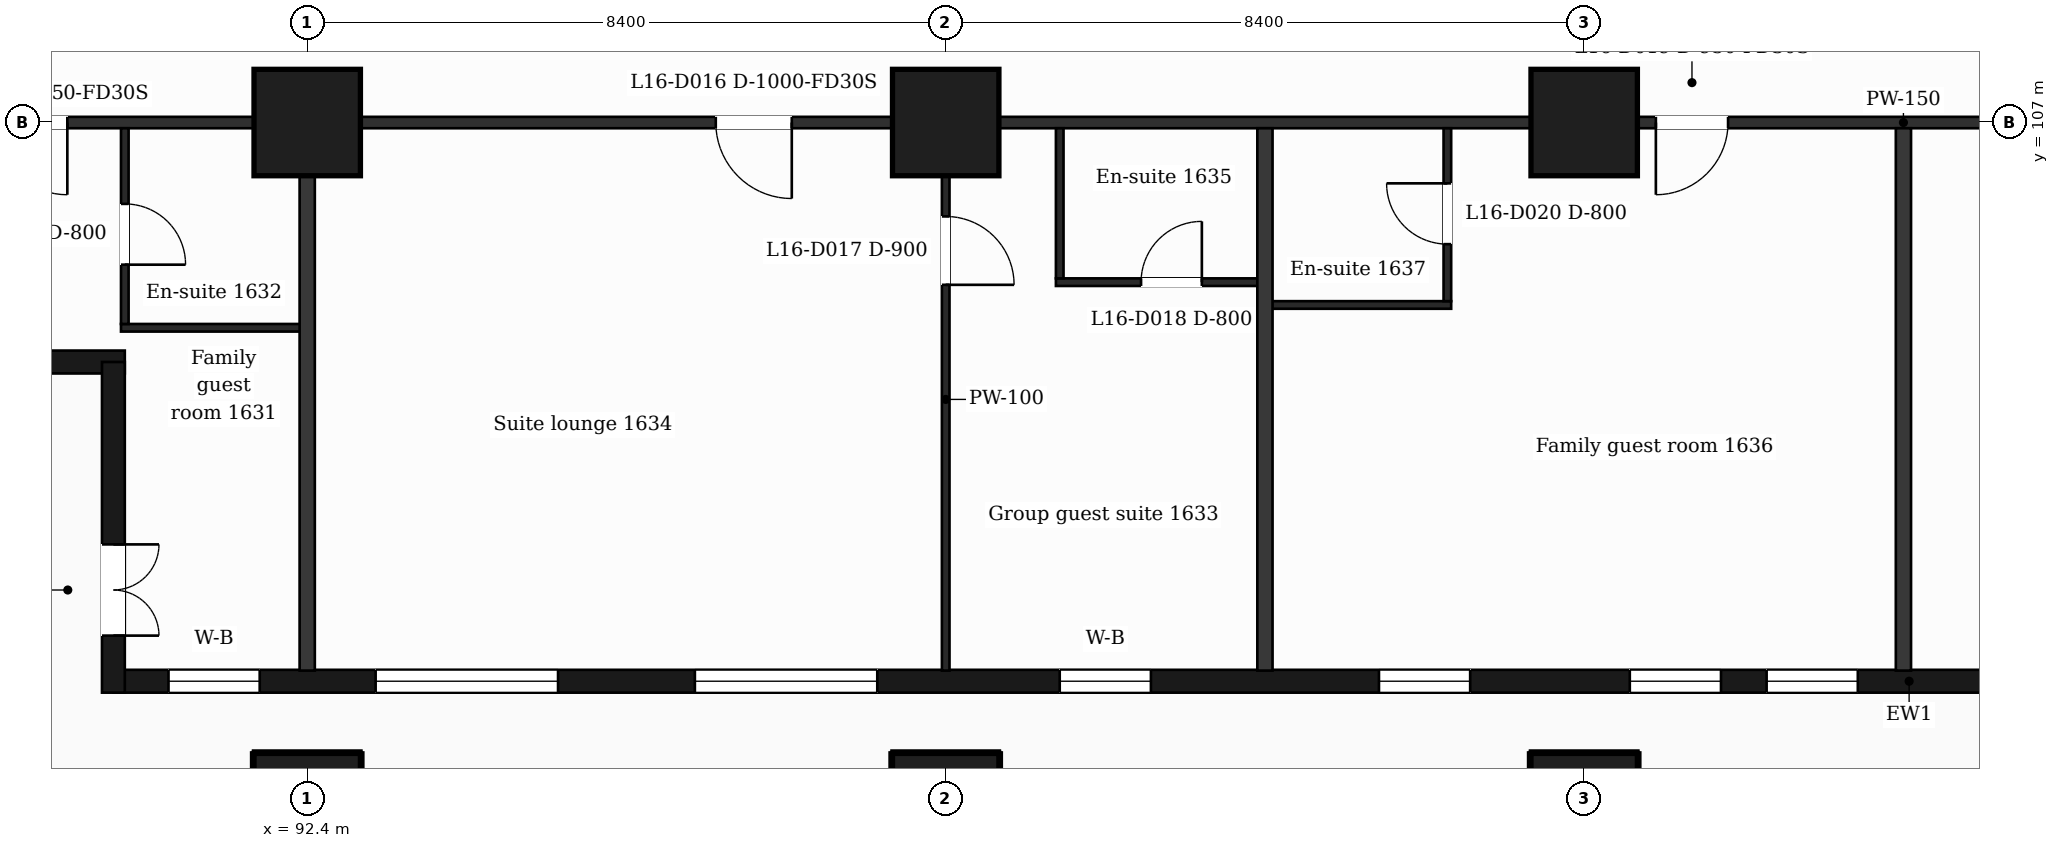
"""IFC4 building model, lengths in metres.
Left out: names, types, materials, properties, quantities, classifications, styles, units other than length and angle.
Written with IfcOpenShell. Run it as: python <this file> out.ifc"""

import sys

from ifc_helpers import new_model, si_unit, direction, frame, frame_2d, origin, origin_2d, place, context, subcontext, project, spatial, rectangle, extrude, element, fill, save


model = new_model("IFC4")
c1 = context("Model", 3, precision=1e-05, world=origin(), true_north=direction((0.0, 1.0)))
c2 = subcontext(c1, "Body", "Model", "MODEL_VIEW")
j1 = project(units=[si_unit("LENGTHUNIT", "METRE"), si_unit("PLANEANGLEUNIT", "RADIAN")], contexts=[c1])
p1 = place(None, origin())
s1 = spatial("IfcSite", under=j1, at=p1, CompositionType="ELEMENT")
p2 = place(p1, origin())
s2 = spatial("IfcBuilding", under=s1, at=p2, CompositionType="ELEMENT")
p3 = place(p2, frame((0.0, 0.0, 74.0)))
s3 = spatial("IfcBuildingStorey", under=s2, at=p3, CompositionType="ELEMENT", Elevation=74.0)
for number, where, z_axis, x_axis in (
    (1, (92.4, 98.0, 0.0), (0.0, 0.0, 1.0), (1.0, 0.0, 0.0)),
    (2, (100.8, 98.0, 0.0), (0.0, 0.0, 1.0), (1.0, 0.0, 0.0)),
    (3, (109.2, 98.0, 0.0), (0.0, 0.0, 1.0), (1.0, 0.0, 0.0)),
    (4, (92.4, 107.0, 0.0), (0.0, 0.0, 1.0), (1.0, 0.0, 0.0)),
    (5, (100.8, 107.0, 0.0), (0.0, 0.0, 1.0), (1.0, 0.0, 0.0)),
    (6, (109.2, 107.0, 0.0), (0.0, 0.0, 1.0), (1.0, 0.0, 0.0)),
):
    element("IfcColumn", number, at=place(p3, frame(where, z_axis=z_axis, x_axis=x_axis)), inside=s3, PredefinedType="COLUMN", context=c2, shape_type="SweptSolid", body=[
        extrude(rectangle(XDim=1.4, YDim=1.4, at=origin_2d()), origin(), (0.0, 0.0, 1.0), 3.5),
    ])
p4 = place(p3, frame((89.85, 99.65, 0.0), z_axis=(0.0, 0.0, 1.0), x_axis=(1.0, 0.0, 0.0)))
e7 = element("IfcWall", 7, at=p4, inside=s3, PredefinedType="SOLIDWALL", context=c2, shape_type="SweptSolid", body=[
    extrude(rectangle(XDim=47.25, YDim=0.3, at=frame_2d((23.625, 0.0))), origin(), (0.0, 0.0, 1.0), 3.18),
])
p5 = place(p4, frame((0.725, 0.0, 0.9)))
e8 = element("IfcOpeningElement", 8, at=p5, cuts=e7, PredefinedType="OPENING", context=c2, shape_type="SweptSolid", body=[
    extrude(rectangle(XDim=1.2, YDim=2.1, at=frame_2d((0.6, 1.05))), frame((0.0, 0.16, 0.0), z_axis=(0.0, -1.0, 0.0), x_axis=(1.0, 0.0, 0.0)), (0.0, 0.0, 1.0), 0.32),
])
p6 = place(p4, frame((3.45, 0.0, 0.9)))
e9 = element("IfcOpeningElement", 9, at=p6, cuts=e7, PredefinedType="OPENING", context=c2, shape_type="SweptSolid", body=[
    extrude(rectangle(XDim=2.4, YDim=2.1, at=frame_2d((1.2, 1.05))), frame((0.0, 0.16, 0.0), z_axis=(0.0, -1.0, 0.0), x_axis=(1.0, 0.0, 0.0)), (0.0, 0.0, 1.0), 0.32),
])
p7 = place(p4, frame((7.65, 0.0, 0.9)))
e10 = element("IfcOpeningElement", 10, at=p7, cuts=e7, PredefinedType="OPENING", context=c2, shape_type="SweptSolid", body=[
    extrude(rectangle(XDim=2.4, YDim=2.1, at=frame_2d((1.2, 1.05))), frame((0.0, 0.16, 0.0), z_axis=(0.0, -1.0, 0.0), x_axis=(1.0, 0.0, 0.0)), (0.0, 0.0, 1.0), 0.32),
])
p8 = place(p4, frame((12.45, 0.0, 0.9)))
e11 = element("IfcOpeningElement", 11, at=p8, cuts=e7, PredefinedType="OPENING", context=c2, shape_type="SweptSolid", body=[
    extrude(rectangle(XDim=1.2, YDim=2.1, at=frame_2d((0.6, 1.05))), frame((0.0, 0.16, 0.0), z_axis=(0.0, -1.0, 0.0), x_axis=(1.0, 0.0, 0.0)), (0.0, 0.0, 1.0), 0.32),
])
p9 = place(p4, frame((16.65, 0.0, 0.9)))
e12 = element("IfcOpeningElement", 12, at=p9, cuts=e7, PredefinedType="OPENING", context=c2, shape_type="SweptSolid", body=[
    extrude(rectangle(XDim=1.2, YDim=2.1, at=frame_2d((0.6, 1.05))), frame((0.0, 0.16, 0.0), z_axis=(0.0, -1.0, 0.0), x_axis=(1.0, 0.0, 0.0)), (0.0, 0.0, 1.0), 0.32),
])
p10 = place(p4, frame((19.95, 0.0, 0.9)))
e13 = element("IfcOpeningElement", 13, at=p10, cuts=e7, PredefinedType="OPENING", context=c2, shape_type="SweptSolid", body=[
    extrude(rectangle(XDim=1.2, YDim=2.1, at=frame_2d((0.6, 1.05))), frame((0.0, 0.16, 0.0), z_axis=(0.0, -1.0, 0.0), x_axis=(1.0, 0.0, 0.0)), (0.0, 0.0, 1.0), 0.32),
])
p11 = place(p4, frame((21.75, 0.0, 0.9)))
e14 = element("IfcOpeningElement", 14, at=p11, cuts=e7, PredefinedType="OPENING", context=c2, shape_type="SweptSolid", body=[
    extrude(rectangle(XDim=1.2, YDim=2.1, at=frame_2d((0.6, 1.05))), frame((0.0, 0.16, 0.0), z_axis=(0.0, -1.0, 0.0), x_axis=(1.0, 0.0, 0.0)), (0.0, 0.0, 1.0), 0.32),
])
p12 = place(p4, frame((25.05, 0.0, 0.0)))
e15 = element("IfcOpeningElement", 15, at=p12, cuts=e7, PredefinedType="OPENING", context=c2, shape_type="SweptSolid", body=[
    extrude(rectangle(XDim=1.2, YDim=2.4, at=frame_2d((0.6, 1.2))), frame((0.0, 0.16, 0.0), z_axis=(0.0, -1.0, 0.0), x_axis=(1.0, 0.0, 0.0)), (0.0, 0.0, 1.0), 0.32),
])
p13 = place(p4, frame((28.35, 0.0, 0.9)))
e16 = element("IfcOpeningElement", 16, at=p13, cuts=e7, PredefinedType="OPENING", context=c2, shape_type="SweptSolid", body=[
    extrude(rectangle(XDim=1.2, YDim=2.1, at=frame_2d((0.6, 1.05))), frame((0.0, 0.16, 0.0), z_axis=(0.0, -1.0, 0.0), x_axis=(1.0, 0.0, 0.0)), (0.0, 0.0, 1.0), 0.32),
])
p14 = place(p4, frame((30.15, 0.0, 0.9)))
e17 = element("IfcOpeningElement", 17, at=p14, cuts=e7, PredefinedType="OPENING", context=c2, shape_type="SweptSolid", body=[
    extrude(rectangle(XDim=1.2, YDim=2.1, at=frame_2d((0.6, 1.05))), frame((0.0, 0.16, 0.0), z_axis=(0.0, -1.0, 0.0), x_axis=(1.0, 0.0, 0.0)), (0.0, 0.0, 1.0), 0.32),
])
p15 = place(p4, frame((32.85, 0.0, 0.9)))
e18 = element("IfcOpeningElement", 18, at=p15, cuts=e7, PredefinedType="OPENING", context=c2, shape_type="SweptSolid", body=[
    extrude(rectangle(XDim=2.4, YDim=2.1, at=frame_2d((1.2, 1.05))), frame((0.0, 0.16, 0.0), z_axis=(0.0, -1.0, 0.0), x_axis=(1.0, 0.0, 0.0)), (0.0, 0.0, 1.0), 0.32),
])
p16 = place(p4, frame((37.05, 0.0, 0.9)))
e19 = element("IfcOpeningElement", 19, at=p16, cuts=e7, PredefinedType="OPENING", context=c2, shape_type="SweptSolid", body=[
    extrude(rectangle(XDim=2.4, YDim=2.1, at=frame_2d((1.2, 1.05))), frame((0.0, 0.16, 0.0), z_axis=(0.0, -1.0, 0.0), x_axis=(1.0, 0.0, 0.0)), (0.0, 0.0, 1.0), 0.32),
])
p17 = place(p4, frame((41.85, 0.0, 0.9)))
e20 = element("IfcOpeningElement", 20, at=p17, cuts=e7, PredefinedType="OPENING", context=c2, shape_type="SweptSolid", body=[
    extrude(rectangle(XDim=1.2, YDim=2.1, at=frame_2d((0.6, 1.05))), frame((0.0, 0.16, 0.0), z_axis=(0.0, -1.0, 0.0), x_axis=(1.0, 0.0, 0.0)), (0.0, 0.0, 1.0), 0.32),
])
p18 = place(p4, frame((45.25, 0.0, 0.9)))
e21 = element("IfcOpeningElement", 21, at=p18, cuts=e7, PredefinedType="OPENING", context=c2, shape_type="SweptSolid", body=[
    extrude(rectangle(XDim=1.2, YDim=2.1, at=frame_2d((0.6, 1.05))), frame((0.0, 0.16, 0.0), z_axis=(0.0, -1.0, 0.0), x_axis=(1.0, 0.0, 0.0)), (0.0, 0.0, 1.0), 0.32),
])
p19 = place(p3, frame((86.452, 103.85, 0.0), z_axis=(0.0, 0.0, 1.0), x_axis=(1.0, 0.0, 0.0)))
e22 = element("IfcWall", 22, at=p19, inside=s3, PredefinedType="SOLIDWALL", context=c2, shape_type="SweptSolid", body=[
    extrude(rectangle(XDim=3.548, YDim=0.3, at=frame_2d((1.774, 0.0))), origin(), (0.0, 0.0, 1.0), 3.18),
])
p20 = place(p3, frame((89.85, 103.85, 0.0), z_axis=(0.0, 0.0, 1.0), x_axis=(0.0, -1.0, 0.0)))
e23 = element("IfcWall", 23, at=p20, inside=s3, PredefinedType="SOLIDWALL", context=c2, shape_type="SweptSolid", body=[
    extrude(rectangle(XDim=4.35, YDim=0.3, at=frame_2d((2.175, 0.0))), origin(), (0.0, 0.0, 1.0), 3.18),
])
p21 = place(p20, frame((2.4, 0.0, 0.0)))
e24 = element("IfcOpeningElement", 24, at=p21, cuts=e23, PredefinedType="OPENING", context=c2, shape_type="SweptSolid", body=[
    extrude(rectangle(XDim=1.2, YDim=2.4, at=frame_2d((0.6, 1.2))), frame((0.0, 0.16, 0.0), z_axis=(0.0, -1.0, 0.0), x_axis=(1.0, 0.0, 0.0)), (0.0, 0.0, 1.0), 0.32),
])
for number, where, z_axis, x_axis in (
    (25, (89.95, 104.3, 0.0), (0.0, 0.0, 1.0), (1.0, 0.0, 0.0)),
    (26, (105.0, 104.6, 0.0), (0.0, 0.0, 1.0), (1.0, 0.0, 0.0)),
):
    element("IfcWall", number, at=place(p3, frame(where, z_axis=z_axis, x_axis=x_axis)), inside=s3, PredefinedType="PARTITIONING", context=c2, shape_type="SweptSolid", body=[
        extrude(rectangle(XDim=2.45, YDim=0.1, at=frame_2d((1.225, 0.0))), origin(), (0.0, 0.0, 1.0), 3.18),
    ])
p22 = place(p3, frame((102.25, 104.9, 0.0), z_axis=(0.0, 0.0, 1.0), x_axis=(1.0, 0.0, 0.0)))
e27 = element("IfcWall", 27, at=p22, inside=s3, PredefinedType="PARTITIONING", context=c2, shape_type="SweptSolid", body=[
    extrude(rectangle(XDim=2.75, YDim=0.1, at=frame_2d((1.375, 0.0))), origin(), (0.0, 0.0, 1.0), 3.18),
])
p23 = place(p22, frame((1.12, 0.0, 0.0)))
e28 = element("IfcOpeningElement", 28, at=p23, cuts=e27, PredefinedType="OPENING", context=c2, shape_type="SweptSolid", body=[
    extrude(rectangle(XDim=0.8, YDim=2.1, at=frame_2d((0.4, 1.05))), frame((0.0, 0.06, 0.0), z_axis=(0.0, -1.0, 0.0), x_axis=(1.0, 0.0, 0.0)), (0.0, 0.0, 1.0), 0.12),
])
p24 = place(p3, frame((87.018, 107.0, 0.0), z_axis=(0.0, 0.0, 1.0), x_axis=(1.0, 0.0, 0.0)))
e29 = element("IfcWall", 29, at=p24, inside=s3, PredefinedType="PARTITIONING", context=c2, shape_type="SweptSolid", body=[
    extrude(rectangle(XDim=52.765, YDim=0.15, at=frame_2d((26.382, 0.0))), origin(), (0.0, 0.0, 1.0), 3.18),
])
p25 = place(p24, frame((1.276, 0.0, 0.0)))
e30 = element("IfcOpeningElement", 30, at=p25, cuts=e29, PredefinedType="OPENING", context=c2, shape_type="SweptSolid", body=[
    extrude(rectangle(XDim=0.95, YDim=2.1, at=frame_2d((0.475, 1.05))), frame((0.0, 0.085, 0.0), z_axis=(0.0, -1.0, 0.0), x_axis=(1.0, 0.0, 0.0)), (0.0, 0.0, 1.0), 0.17),
])
p26 = place(p24, frame((10.757, 0.0, 0.0)))
e31 = element("IfcOpeningElement", 31, at=p26, cuts=e29, PredefinedType="OPENING", context=c2, shape_type="SweptSolid", body=[
    extrude(rectangle(XDim=1.0, YDim=2.1, at=frame_2d((0.5, 1.05))), frame((0.0, 0.085, 0.0), z_axis=(0.0, -1.0, 0.0), x_axis=(1.0, 0.0, 0.0)), (0.0, 0.0, 1.0), 0.17),
])
p27 = place(p24, frame((23.125, 0.0, 0.0)))
e32 = element("IfcOpeningElement", 32, at=p27, cuts=e29, PredefinedType="OPENING", context=c2, shape_type="SweptSolid", body=[
    extrude(rectangle(XDim=0.95, YDim=2.1, at=frame_2d((0.475, 1.05))), frame((0.0, 0.085, 0.0), z_axis=(0.0, -1.0, 0.0), x_axis=(1.0, 0.0, 0.0)), (0.0, 0.0, 1.0), 0.17),
])
p28 = place(p24, frame((31.757, 0.0, 0.0)))
e33 = element("IfcOpeningElement", 33, at=p28, cuts=e29, PredefinedType="OPENING", context=c2, shape_type="SweptSolid", body=[
    extrude(rectangle(XDim=1.0, YDim=2.1, at=frame_2d((0.5, 1.05))), frame((0.0, 0.085, 0.0), z_axis=(0.0, -1.0, 0.0), x_axis=(1.0, 0.0, 0.0)), (0.0, 0.0, 1.0), 0.17),
])
p29 = place(p24, frame((42.819, 0.0, 0.0)))
e34 = element("IfcOpeningElement", 34, at=p29, cuts=e29, PredefinedType="OPENING", context=c2, shape_type="SweptSolid", body=[
    extrude(rectangle(XDim=0.95, YDim=2.1, at=frame_2d((0.475, 1.05))), frame((0.0, 0.085, 0.0), z_axis=(0.0, -1.0, 0.0), x_axis=(1.0, 0.0, 0.0)), (0.0, 0.0, 1.0), 0.17),
])
p30 = place(p24, frame((48.974, 0.0, 0.0)))
e35 = element("IfcOpeningElement", 35, at=p30, cuts=e29, PredefinedType="OPENING", context=c2, shape_type="SweptSolid", body=[
    extrude(rectangle(XDim=0.95, YDim=2.1, at=frame_2d((0.475, 1.05))), frame((0.0, 0.085, 0.0), z_axis=(0.0, -1.0, 0.0), x_axis=(1.0, 0.0, 0.0)), (0.0, 0.0, 1.0), 0.17),
])
p31 = place(p3, frame((90.0, 104.35, 0.0), z_axis=(0.0, 0.0, 1.0), x_axis=(0.0, 1.0, 0.0)))
e36 = element("IfcWall", 36, at=p31, inside=s3, PredefinedType="PARTITIONING", context=c2, shape_type="SweptSolid", body=[
    extrude(rectangle(XDim=2.575, YDim=0.1, at=frame_2d((1.288, 0.0))), origin(), (0.0, 0.0, 1.0), 3.18),
])
p32 = place(p31, frame((0.78, 0.0, 0.0)))
e37 = element("IfcOpeningElement", 37, at=p32, cuts=e36, PredefinedType="OPENING", context=c2, shape_type="SweptSolid", body=[
    extrude(rectangle(XDim=0.8, YDim=2.1, at=frame_2d((0.4, 1.05))), frame((0.0, 0.06, 0.0), z_axis=(0.0, -1.0, 0.0), x_axis=(1.0, 0.0, 0.0)), (0.0, 0.0, 1.0), 0.12),
])
p33 = place(p3, frame((92.4, 99.79, 0.0), z_axis=(0.0, 0.0, 1.0), x_axis=(0.0, 1.0, 0.0)))
e38 = element("IfcWall", 38, at=p33, inside=s3, PredefinedType="PARTITIONING", context=c2, shape_type="SweptSolid", body=[
    extrude(rectangle(XDim=7.135, YDim=0.2, at=frame_2d((3.567, 0.0))), origin(), (0.0, 0.0, 1.0), 3.18),
])
p34 = place(p3, frame((100.8, 99.79, 0.0), z_axis=(0.0, 0.0, 1.0), x_axis=(0.0, 1.0, 0.0)))
e39 = element("IfcWall", 39, at=p34, inside=s3, PredefinedType="PARTITIONING", context=c2, shape_type="SweptSolid", body=[
    extrude(rectangle(XDim=7.135, YDim=0.1, at=frame_2d((3.567, 0.0))), origin(), (0.0, 0.0, 1.0), 3.18),
])
p35 = place(p34, frame((5.075, 0.0, 0.0)))
e40 = element("IfcOpeningElement", 40, at=p35, cuts=e39, PredefinedType="OPENING", context=c2, shape_type="SweptSolid", body=[
    extrude(rectangle(XDim=0.9, YDim=2.1, at=frame_2d((0.45, 1.05))), frame((0.0, 0.06, 0.0), z_axis=(0.0, -1.0, 0.0), x_axis=(1.0, 0.0, 0.0)), (0.0, 0.0, 1.0), 0.12),
])
p36 = place(p3, frame((102.3, 104.95, 0.0), z_axis=(0.0, 0.0, 1.0), x_axis=(0.0, 1.0, 0.0)))
e41 = element("IfcWall", 41, at=p36, inside=s3, PredefinedType="PARTITIONING", context=c2, shape_type="SweptSolid", body=[
    extrude(rectangle(XDim=1.975, YDim=0.1, at=frame_2d((0.988, 0.0))), origin(), (0.0, 0.0, 1.0), 3.18),
])
p37 = place(p3, frame((105.0, 99.79, 0.0), z_axis=(0.0, 0.0, 1.0), x_axis=(0.0, 1.0, 0.0)))
e42 = element("IfcWall", 42, at=p37, inside=s3, PredefinedType="PARTITIONING", context=c2, shape_type="SweptSolid", body=[
    extrude(rectangle(XDim=7.135, YDim=0.2, at=frame_2d((3.567, 0.0))), origin(), (0.0, 0.0, 1.0), 3.18),
])
p38 = place(p3, frame((107.4, 104.65, 0.0), z_axis=(0.0, 0.0, 1.0), x_axis=(0.0, 1.0, 0.0)))
e43 = element("IfcWall", 43, at=p38, inside=s3, PredefinedType="PARTITIONING", context=c2, shape_type="SweptSolid", body=[
    extrude(rectangle(XDim=2.275, YDim=0.1, at=frame_2d((1.138, 0.0))), origin(), (0.0, 0.0, 1.0), 3.18),
])
p39 = place(p38, frame((0.75, 0.0, 0.0)))
e44 = element("IfcOpeningElement", 44, at=p39, cuts=e43, PredefinedType="OPENING", context=c2, shape_type="SweptSolid", body=[
    extrude(rectangle(XDim=0.8, YDim=2.1, at=frame_2d((0.4, 1.05))), frame((0.0, 0.06, 0.0), z_axis=(0.0, -1.0, 0.0), x_axis=(1.0, 0.0, 0.0)), (0.0, 0.0, 1.0), 0.12),
])
p40 = place(p3, frame((113.4, 99.79, 0.0), z_axis=(0.0, 0.0, 1.0), x_axis=(0.0, 1.0, 0.0)))
e45 = element("IfcWall", 45, at=p40, inside=s3, PredefinedType="PARTITIONING", context=c2, shape_type="SweptSolid", body=[
    extrude(rectangle(XDim=7.135, YDim=0.2, at=frame_2d((3.567, 0.0))), origin(), (0.0, 0.0, 1.0), 3.18),
])
p41 = place(p5, origin())
e46 = element("IfcWindow", 46, at=p41, inside=s3, PartitioningType="SINGLE_PANEL", PredefinedType="WINDOW", context=c2, shape_type="SweptSolid", body=[
    extrude(rectangle(XDim=1.2, YDim=2.1, at=frame_2d((0.6, 1.05))), frame((0.0, 0.03, 0.0), z_axis=(0.0, -1.0, 0.0), x_axis=(1.0, 0.0, 0.0)), (0.0, 0.0, 1.0), 0.06),
])
fill(e8, e46)
p42 = place(p6, origin())
e47 = element("IfcWindow", 47, at=p42, inside=s3, PartitioningType="SINGLE_PANEL", PredefinedType="WINDOW", context=c2, shape_type="SweptSolid", body=[
    extrude(rectangle(XDim=2.4, YDim=2.1, at=frame_2d((1.2, 1.05))), frame((0.0, 0.03, 0.0), z_axis=(0.0, -1.0, 0.0), x_axis=(1.0, 0.0, 0.0)), (0.0, 0.0, 1.0), 0.06),
])
fill(e9, e47)
p43 = place(p7, origin())
e48 = element("IfcWindow", 48, at=p43, inside=s3, PartitioningType="SINGLE_PANEL", PredefinedType="WINDOW", context=c2, shape_type="SweptSolid", body=[
    extrude(rectangle(XDim=2.4, YDim=2.1, at=frame_2d((1.2, 1.05))), frame((0.0, 0.03, 0.0), z_axis=(0.0, -1.0, 0.0), x_axis=(1.0, 0.0, 0.0)), (0.0, 0.0, 1.0), 0.06),
])
fill(e10, e48)
p44 = place(p8, origin())
e49 = element("IfcWindow", 49, at=p44, inside=s3, PartitioningType="SINGLE_PANEL", PredefinedType="WINDOW", context=c2, shape_type="SweptSolid", body=[
    extrude(rectangle(XDim=1.2, YDim=2.1, at=frame_2d((0.6, 1.05))), frame((0.0, 0.03, 0.0), z_axis=(0.0, -1.0, 0.0), x_axis=(1.0, 0.0, 0.0)), (0.0, 0.0, 1.0), 0.06),
])
fill(e11, e49)
p45 = place(p9, origin())
e50 = element("IfcWindow", 50, at=p45, inside=s3, PartitioningType="SINGLE_PANEL", PredefinedType="WINDOW", context=c2, shape_type="SweptSolid", body=[
    extrude(rectangle(XDim=1.2, YDim=2.1, at=frame_2d((0.6, 1.05))), frame((0.0, 0.03, 0.0), z_axis=(0.0, -1.0, 0.0), x_axis=(1.0, 0.0, 0.0)), (0.0, 0.0, 1.0), 0.06),
])
fill(e12, e50)
p46 = place(p10, origin())
e51 = element("IfcWindow", 51, at=p46, inside=s3, PartitioningType="SINGLE_PANEL", PredefinedType="WINDOW", context=c2, shape_type="SweptSolid", body=[
    extrude(rectangle(XDim=1.2, YDim=2.1, at=frame_2d((0.6, 1.05))), frame((0.0, 0.03, 0.0), z_axis=(0.0, -1.0, 0.0), x_axis=(1.0, 0.0, 0.0)), (0.0, 0.0, 1.0), 0.06),
])
fill(e13, e51)
p47 = place(p11, origin())
e52 = element("IfcWindow", 52, at=p47, inside=s3, PartitioningType="SINGLE_PANEL", PredefinedType="WINDOW", context=c2, shape_type="SweptSolid", body=[
    extrude(rectangle(XDim=1.2, YDim=2.1, at=frame_2d((0.6, 1.05))), frame((0.0, 0.03, 0.0), z_axis=(0.0, -1.0, 0.0), x_axis=(1.0, 0.0, 0.0)), (0.0, 0.0, 1.0), 0.06),
])
fill(e14, e52)
p48 = place(p21, origin())
e53 = element("IfcDoor", 53, at=p48, inside=s3, OperationType="DOUBLE_DOOR_SINGLE_SWING", PredefinedType="DOOR", context=c2, shape_type="SweptSolid", body=[
    extrude(rectangle(XDim=1.2, YDim=2.4, at=frame_2d((0.6, 1.2))), frame((0.0, 0.025, 0.0), z_axis=(0.0, -1.0, 0.0), x_axis=(1.0, 0.0, 0.0)), (0.0, 0.0, 1.0), 0.05),
])
fill(e24, e53)
p49 = place(p25, origin())
e54 = element("IfcDoor", 54, at=p49, inside=s3, OperationType="SINGLE_SWING_RIGHT", PredefinedType="DOOR", context=c2, shape_type="SweptSolid", body=[
    extrude(rectangle(XDim=0.95, YDim=2.1, at=frame_2d((0.475, 1.05))), frame((0.0, 0.025, 0.0), z_axis=(0.0, -1.0, 0.0), x_axis=(1.0, 0.0, 0.0)), (0.0, 0.0, 1.0), 0.05),
])
fill(e30, e54)
p50 = place(p32, origin())
e55 = element("IfcDoor", 55, at=p50, inside=s3, OperationType="SINGLE_SWING_LEFT", PredefinedType="DOOR", context=c2, shape_type="SweptSolid", body=[
    extrude(rectangle(XDim=0.8, YDim=2.1, at=frame_2d((0.4, 1.05))), frame((0.0, 0.025, 0.0), z_axis=(0.0, -1.0, 0.0), x_axis=(1.0, 0.0, 0.0)), (0.0, 0.0, 1.0), 0.05),
])
fill(e37, e55)
p51 = place(p26, origin())
e56 = element("IfcDoor", 56, at=p51, inside=s3, OperationType="SINGLE_SWING_RIGHT", PredefinedType="DOOR", context=c2, shape_type="SweptSolid", body=[
    extrude(rectangle(XDim=1.0, YDim=2.1, at=frame_2d((0.5, 1.05))), frame((0.0, 0.025, 0.0), z_axis=(0.0, -1.0, 0.0), x_axis=(1.0, 0.0, 0.0)), (0.0, 0.0, 1.0), 0.05),
])
fill(e31, e56)
p52 = place(p35, origin())
e57 = element("IfcDoor", 57, at=p52, inside=s3, OperationType="SINGLE_SWING_LEFT", PredefinedType="DOOR", context=c2, shape_type="SweptSolid", body=[
    extrude(rectangle(XDim=0.9, YDim=2.1, at=frame_2d((0.45, 1.05))), frame((0.0, 0.025, 0.0), z_axis=(0.0, -1.0, 0.0), x_axis=(1.0, 0.0, 0.0)), (0.0, 0.0, 1.0), 0.05),
])
fill(e40, e57)
p53 = place(p23, origin())
e58 = element("IfcDoor", 58, at=p53, inside=s3, OperationType="SINGLE_SWING_RIGHT", PredefinedType="DOOR", context=c2, shape_type="SweptSolid", body=[
    extrude(rectangle(XDim=0.8, YDim=2.1, at=frame_2d((0.4, 1.05))), frame((0.0, 0.025, 0.0), z_axis=(0.0, -1.0, 0.0), x_axis=(1.0, 0.0, 0.0)), (0.0, 0.0, 1.0), 0.05),
])
fill(e28, e58)
p54 = place(p27, origin())
e59 = element("IfcDoor", 59, at=p54, inside=s3, OperationType="SINGLE_SWING_LEFT", PredefinedType="DOOR", context=c2, shape_type="SweptSolid", body=[
    extrude(rectangle(XDim=0.95, YDim=2.1, at=frame_2d((0.475, 1.05))), frame((0.0, 0.025, 0.0), z_axis=(0.0, -1.0, 0.0), x_axis=(1.0, 0.0, 0.0)), (0.0, 0.0, 1.0), 0.05),
])
fill(e32, e59)
p55 = place(p39, origin())
e60 = element("IfcDoor", 60, at=p55, inside=s3, OperationType="SINGLE_SWING_RIGHT", PredefinedType="DOOR", context=c2, shape_type="SweptSolid", body=[
    extrude(rectangle(XDim=0.8, YDim=2.1, at=frame_2d((0.4, 1.05))), frame((0.0, 0.025, 0.0), z_axis=(0.0, -1.0, 0.0), x_axis=(1.0, 0.0, 0.0)), (0.0, 0.0, 1.0), 0.05),
])
fill(e44, e60)
save(model, sys.argv[1])
